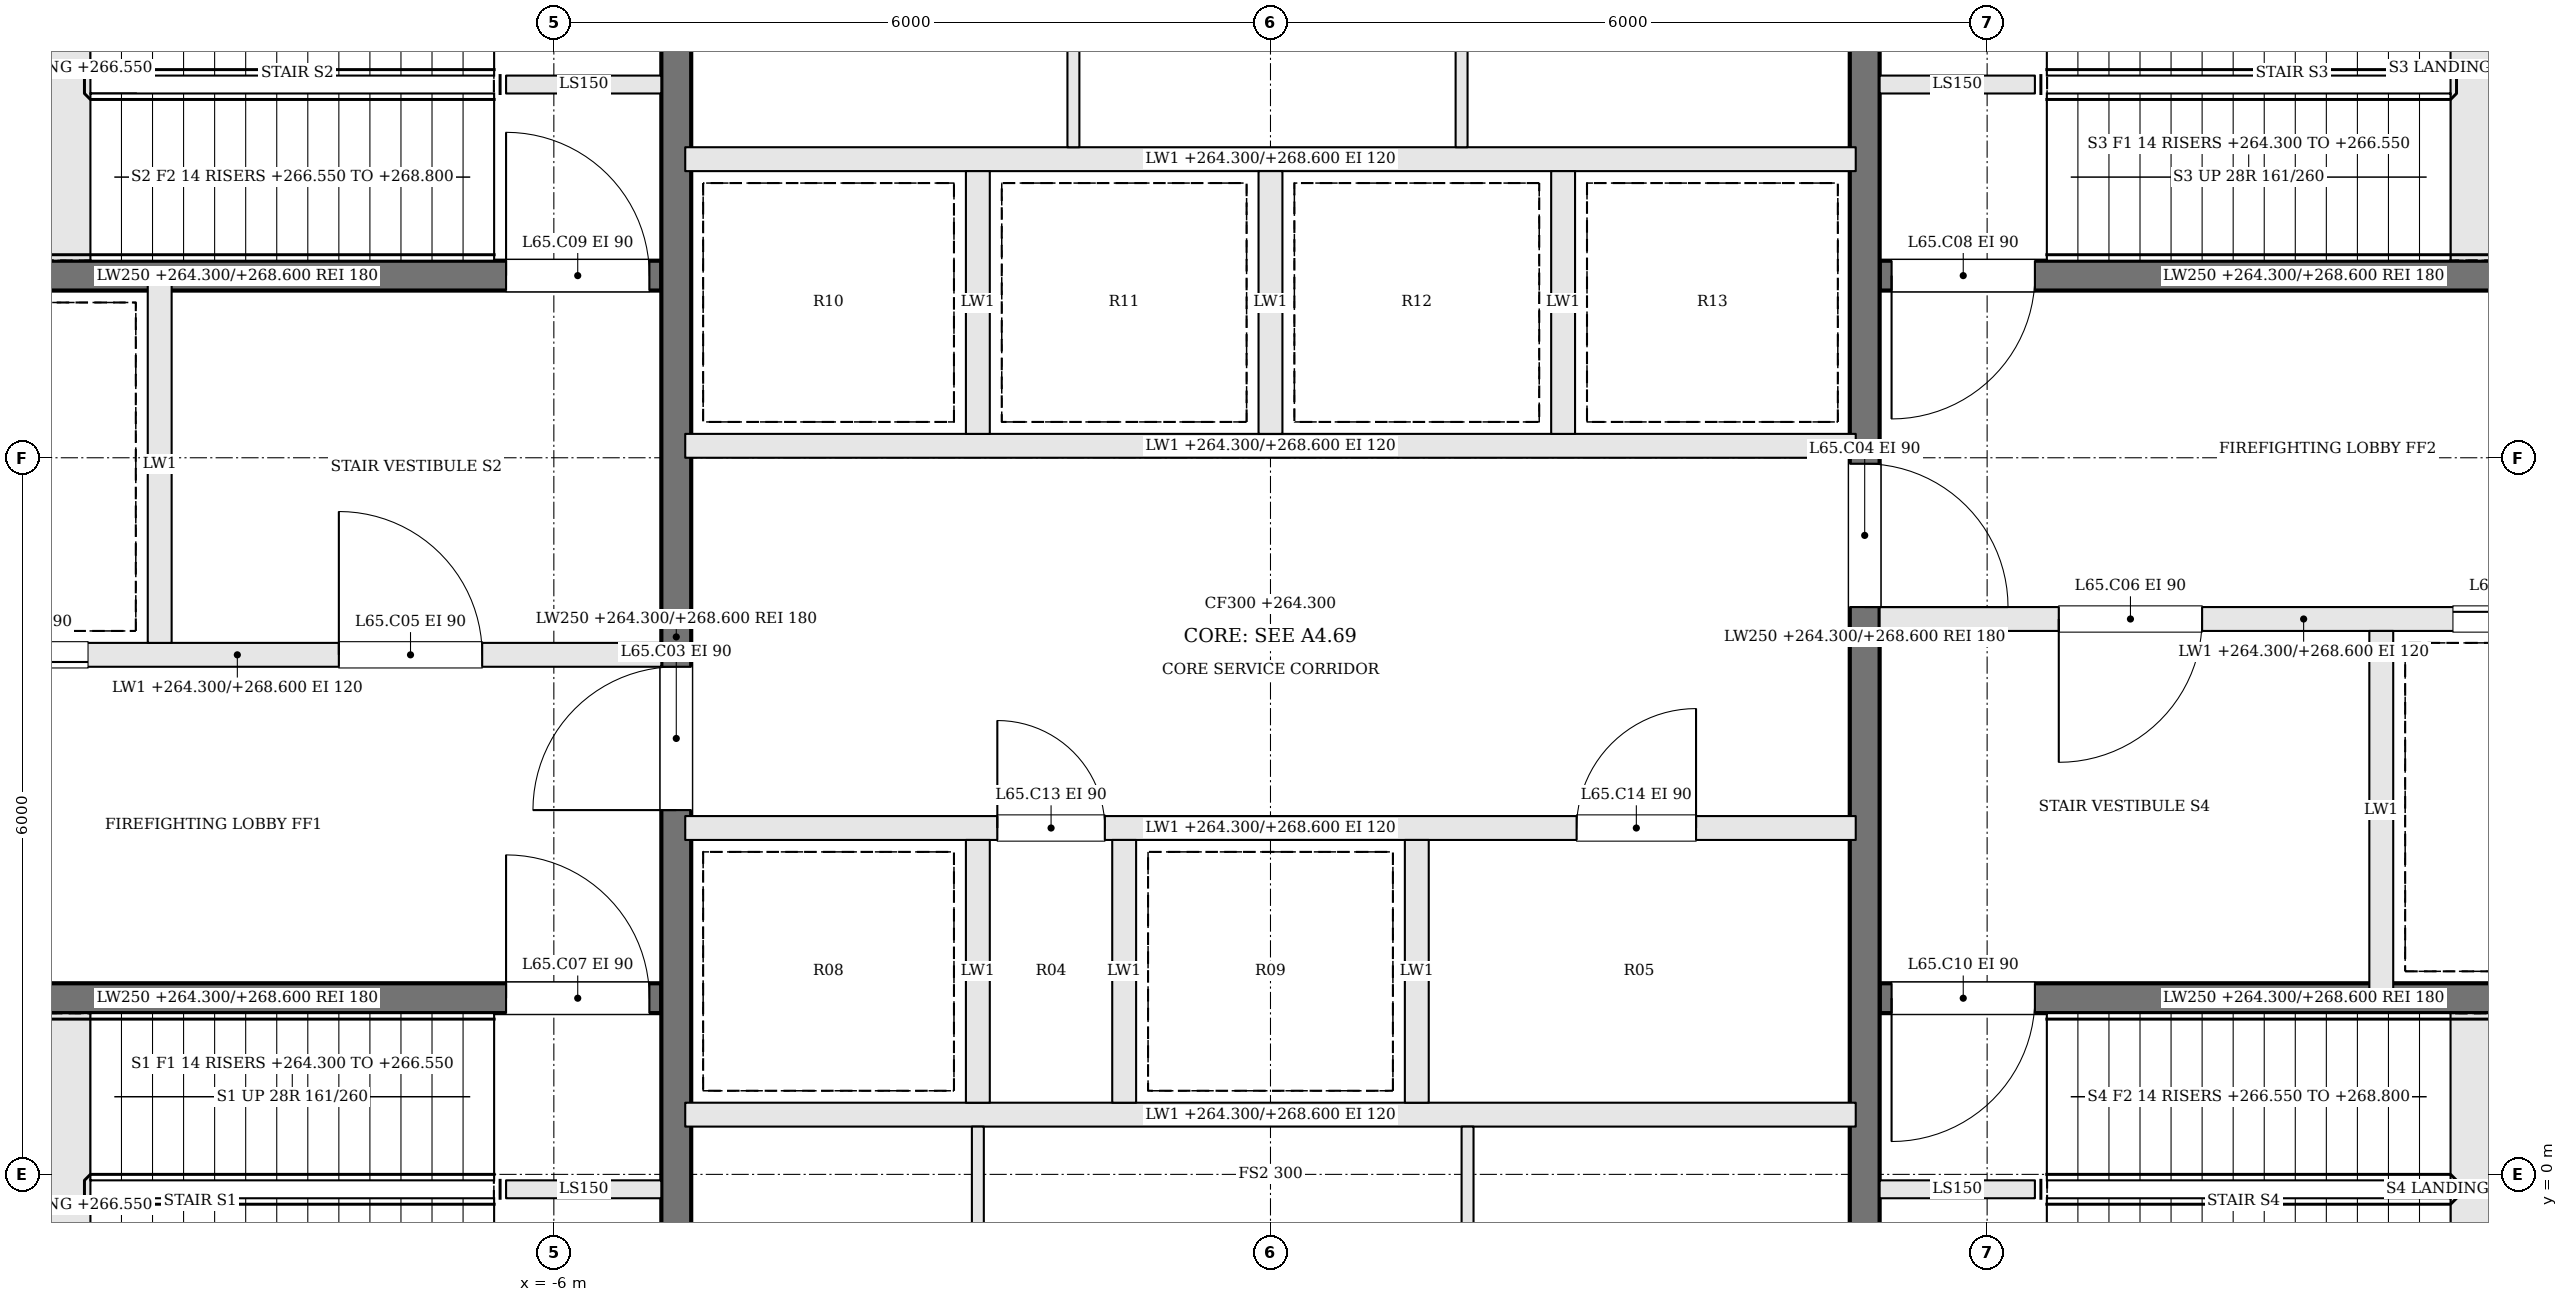
"""IFC4 building model, lengths in metres.
Left out: names, types, materials, properties, quantities, classifications, styles, units other than length and angle.
Written with IfcOpenShell. Run it as: python <this file> out.ifc"""

import sys

from ifc_helpers import new_model, si_unit, direction, frame, frame_2d, origin, place, context, subcontext, project, spatial, rectangle, extrude, element, fill, save


model = new_model("IFC4")
c1 = context("Model", 3, precision=1e-05, world=origin(), true_north=direction((0.0, 1.0)))
c2 = subcontext(c1, "Body", "Model", "MODEL_VIEW")
j1 = project(units=[si_unit("LENGTHUNIT", "METRE"), si_unit("PLANEANGLEUNIT", "RADIAN")], contexts=[c1])
p1 = place(None, origin())
s1 = spatial("IfcSite", under=j1, at=p1, CompositionType="ELEMENT")
p2 = place(p1, origin())
s2 = spatial("IfcBuilding", under=s1, at=p2, CompositionType="ELEMENT")
p3 = place(p2, frame((0.0, 0.0, 264.3)))
s3 = spatial("IfcBuildingStorey", under=s2, at=p3, CompositionType="ELEMENT", Elevation=264.3)
for number, where, z_axis, x_axis in (
    (1, (-6.4, -0.125, 0.0), (0.0, 0.0, 1.0), (1.0, 0.0, 0.0)),
    (2, (6.4, 9.125, 0.0), (0.0, 0.0, 1.0), (-1.0, 0.0, 0.0)),
    (3, (-6.4, 9.125, 0.0), (0.0, 0.0, 1.0), (1.0, 0.0, 0.0)),
    (4, (6.4, -0.125, 0.0), (0.0, 0.0, 1.0), (-1.0, 0.0, 0.0)),
):
    element("IfcWall", number, at=place(p3, frame(where, z_axis=z_axis, x_axis=x_axis)), inside=s3, PredefinedType="SOLIDWALL", context=c2, shape_type="SweptSolid", body=[
        extrude(rectangle(XDim=1.3, YDim=0.15, at=frame_2d((0.65, 0.0))), origin(), (0.0, 0.0, 1.0), 4.3),
    ])
p4 = place(p3, frame((-12.2, 1.475, 0.0), z_axis=(0.0, 0.0, 1.0), x_axis=(1.0, 0.0, 0.0)))
e5 = element("IfcWall", 5, at=p4, inside=s3, PredefinedType="SOLIDWALL", context=c2, shape_type="SweptSolid", body=[
    extrude(rectangle(XDim=7.1, YDim=0.25, at=frame_2d((3.55, 0.0))), origin(), (0.0, 0.0, 1.0), 4.3),
])
p5 = place(p4, frame((5.8, 0.0, 0.0)))
e6 = element("IfcOpeningElement", 6, at=p5, cuts=e5, PredefinedType="OPENING", context=c2, shape_type="SweptSolid", body=[
    extrude(rectangle(XDim=1.2, YDim=2.1, at=frame_2d((0.6, 1.05))), frame((0.0, 0.135, 0.0), z_axis=(0.0, -1.0, 0.0), x_axis=(1.0, 0.0, 0.0)), (0.0, 0.0, 1.0), 0.27),
])
p6 = place(p3, frame((12.2, 7.525, 0.0), z_axis=(0.0, 0.0, 1.0), x_axis=(-1.0, 0.0, 0.0)))
e7 = element("IfcWall", 7, at=p6, inside=s3, PredefinedType="SOLIDWALL", context=c2, shape_type="SweptSolid", body=[
    extrude(rectangle(XDim=7.1, YDim=0.25, at=frame_2d((3.55, 0.0))), origin(), (0.0, 0.0, 1.0), 4.3),
])
p7 = place(p6, frame((5.8, 0.0, 0.0)))
e8 = element("IfcOpeningElement", 8, at=p7, cuts=e7, PredefinedType="OPENING", context=c2, shape_type="SweptSolid", body=[
    extrude(rectangle(XDim=1.2, YDim=2.1, at=frame_2d((0.6, 1.05))), frame((0.0, 0.135, 0.0), z_axis=(0.0, -1.0, 0.0), x_axis=(1.0, 0.0, 0.0)), (0.0, 0.0, 1.0), 0.27),
])
p8 = place(p3, frame((-12.2, 4.35, 0.0), z_axis=(0.0, 0.0, 1.0), x_axis=(1.0, 0.0, 0.0)))
e9 = element("IfcWall", 9, at=p8, inside=s3, PredefinedType="SOLIDWALL", context=c2, shape_type="SweptSolid", body=[
    extrude(rectangle(XDim=7.1, YDim=0.2, at=frame_2d((3.55, 0.0))), origin(), (0.0, 0.0, 1.0), 4.3),
])
p9 = place(p8, frame((4.4, 0.0, 0.0)))
e10 = element("IfcOpeningElement", 10, at=p9, cuts=e9, PredefinedType="OPENING", context=c2, shape_type="SweptSolid", body=[
    extrude(rectangle(XDim=1.2, YDim=2.1, at=frame_2d((0.6, 1.05))), frame((0.0, 0.11, 0.0), z_axis=(0.0, -1.0, 0.0), x_axis=(1.0, 0.0, 0.0)), (0.0, 0.0, 1.0), 0.22),
])
p10 = place(p8, frame((1.1, 0.0, 0.0)))
e11 = element("IfcOpeningElement", 11, at=p10, cuts=e9, PredefinedType="OPENING", context=c2, shape_type="SweptSolid", body=[
    extrude(rectangle(XDim=1.2, YDim=2.1, at=frame_2d((0.6, 1.05))), frame((0.0, 0.11, 0.0), z_axis=(0.0, -1.0, 0.0), x_axis=(1.0, 0.0, 0.0)), (0.0, 0.0, 1.0), 0.22),
])
p11 = place(p3, frame((12.2, 4.65, 0.0), z_axis=(0.0, 0.0, 1.0), x_axis=(-1.0, 0.0, 0.0)))
e12 = element("IfcWall", 12, at=p11, inside=s3, PredefinedType="SOLIDWALL", context=c2, shape_type="SweptSolid", body=[
    extrude(rectangle(XDim=7.1, YDim=0.2, at=frame_2d((3.55, 0.0))), origin(), (0.0, 0.0, 1.0), 4.3),
])
p12 = place(p11, frame((4.4, 0.0, 0.0)))
e13 = element("IfcOpeningElement", 13, at=p12, cuts=e12, PredefinedType="OPENING", context=c2, shape_type="SweptSolid", body=[
    extrude(rectangle(XDim=1.2, YDim=2.1, at=frame_2d((0.6, 1.05))), frame((0.0, 0.11, 0.0), z_axis=(0.0, -1.0, 0.0), x_axis=(1.0, 0.0, 0.0)), (0.0, 0.0, 1.0), 0.22),
])
p13 = place(p11, frame((1.1, 0.0, 0.0)))
e14 = element("IfcOpeningElement", 14, at=p13, cuts=e12, PredefinedType="OPENING", context=c2, shape_type="SweptSolid", body=[
    extrude(rectangle(XDim=1.2, YDim=2.1, at=frame_2d((0.6, 1.05))), frame((0.0, 0.11, 0.0), z_axis=(0.0, -1.0, 0.0), x_axis=(1.0, 0.0, 0.0)), (0.0, 0.0, 1.0), 0.22),
])
p14 = place(p3, frame((-12.2, 7.525, 0.0), z_axis=(0.0, 0.0, 1.0), x_axis=(1.0, 0.0, 0.0)))
e15 = element("IfcWall", 15, at=p14, inside=s3, PredefinedType="SOLIDWALL", context=c2, shape_type="SweptSolid", body=[
    extrude(rectangle(XDim=7.1, YDim=0.25, at=frame_2d((3.55, 0.0))), origin(), (0.0, 0.0, 1.0), 4.3),
])
p15 = place(p14, frame((5.8, 0.0, 0.0)))
e16 = element("IfcOpeningElement", 16, at=p15, cuts=e15, PredefinedType="OPENING", context=c2, shape_type="SweptSolid", body=[
    extrude(rectangle(XDim=1.2, YDim=2.1, at=frame_2d((0.6, 1.05))), frame((0.0, 0.135, 0.0), z_axis=(0.0, -1.0, 0.0), x_axis=(1.0, 0.0, 0.0)), (0.0, 0.0, 1.0), 0.27),
])
p16 = place(p3, frame((12.2, 1.475, 0.0), z_axis=(0.0, 0.0, 1.0), x_axis=(-1.0, 0.0, 0.0)))
e17 = element("IfcWall", 17, at=p16, inside=s3, PredefinedType="SOLIDWALL", context=c2, shape_type="SweptSolid", body=[
    extrude(rectangle(XDim=7.1, YDim=0.25, at=frame_2d((3.55, 0.0))), origin(), (0.0, 0.0, 1.0), 4.3),
])
p17 = place(p16, frame((5.8, 0.0, 0.0)))
e18 = element("IfcOpeningElement", 18, at=p17, cuts=e17, PredefinedType="OPENING", context=c2, shape_type="SweptSolid", body=[
    extrude(rectangle(XDim=1.2, YDim=2.1, at=frame_2d((0.6, 1.05))), frame((0.0, 0.135, 0.0), z_axis=(0.0, -1.0, 0.0), x_axis=(1.0, 0.0, 0.0)), (0.0, 0.0, 1.0), 0.27),
])
for number, where, z_axis, x_axis in (
    (19, (-9.3, 4.45, 0.0), (0.0, 0.0, 1.0), (0.0, 1.0, 0.0)),
    (20, (9.3, 4.55, 0.0), (0.0, 0.0, 1.0), (0.0, -1.0, 0.0)),
):
    element("IfcWall", number, at=place(p3, frame(where, z_axis=z_axis, x_axis=x_axis)), inside=s3, PredefinedType="SOLIDWALL", context=c2, shape_type="SweptSolid", body=[
        extrude(rectangle(XDim=3.0, YDim=0.2, at=frame_2d((1.5, 0.0))), origin(), (0.0, 0.0, 1.0), 4.3),
    ])
p18 = place(p3, frame((-4.975, -2.2, 0.0), z_axis=(0.0, 0.0, 1.0), x_axis=(0.0, 1.0, 0.0)))
e21 = element("IfcWall", 21, at=p18, inside=s3, PredefinedType="SOLIDWALL", context=c2, shape_type="SweptSolid", body=[
    extrude(rectangle(XDim=13.4, YDim=0.25, at=frame_2d((6.7, 0.0))), origin(), (0.0, 0.0, 1.0), 4.3),
])
p19 = place(p18, frame((5.25, 0.0, 0.0)))
e22 = element("IfcOpeningElement", 22, at=p19, cuts=e21, PredefinedType="OPENING", context=c2, shape_type="SweptSolid", body=[
    extrude(rectangle(XDim=1.2, YDim=2.1, at=frame_2d((0.6, 1.05))), frame((0.0, 0.135, 0.0), z_axis=(0.0, -1.0, 0.0), x_axis=(1.0, 0.0, 0.0)), (0.0, 0.0, 1.0), 0.27),
])
p20 = place(p3, frame((4.975, 11.2, 0.0), z_axis=(0.0, 0.0, 1.0), x_axis=(0.0, -1.0, 0.0)))
e23 = element("IfcWall", 23, at=p20, inside=s3, PredefinedType="SOLIDWALL", context=c2, shape_type="SweptSolid", body=[
    extrude(rectangle(XDim=13.4, YDim=0.25, at=frame_2d((6.7, 0.0))), origin(), (0.0, 0.0, 1.0), 4.3),
])
p21 = place(p20, frame((5.25, 0.0, 0.0)))
e24 = element("IfcOpeningElement", 24, at=p21, cuts=e23, PredefinedType="OPENING", context=c2, shape_type="SweptSolid", body=[
    extrude(rectangle(XDim=1.2, YDim=2.1, at=frame_2d((0.6, 1.05))), frame((0.0, 0.135, 0.0), z_axis=(0.0, -1.0, 0.0), x_axis=(1.0, 0.0, 0.0)), (0.0, 0.0, 1.0), 0.27),
])
p22 = place(p3, frame((-4.9, 0.5, 0.0), z_axis=(0.0, 0.0, 1.0), x_axis=(1.0, 0.0, 0.0)))
e25 = element("IfcWall", 25, at=p22, inside=s3, PredefinedType="SOLIDWALL", context=c2, shape_type="SweptSolid", body=[
    extrude(rectangle(XDim=9.8, YDim=0.2, at=frame_2d((4.9, 0.0))), origin(), (0.0, 0.0, 1.0), 4.3),
])
p23 = place(p3, frame((-4.9, 2.9, 0.0), z_axis=(0.0, 0.0, 1.0), x_axis=(1.0, 0.0, 0.0)))
e26 = element("IfcWall", 26, at=p23, inside=s3, PredefinedType="SOLIDWALL", context=c2, shape_type="SweptSolid", body=[
    extrude(rectangle(XDim=9.8, YDim=0.2, at=frame_2d((4.9, 0.0))), origin(), (0.0, 0.0, 1.0), 4.3),
])
p24 = place(p23, frame((2.613, 0.0, 0.0)))
e27 = element("IfcOpeningElement", 27, at=p24, cuts=e26, PredefinedType="OPENING", context=c2, shape_type="SweptSolid", body=[
    extrude(rectangle(XDim=0.9, YDim=2.1, at=frame_2d((0.45, 1.05))), frame((0.0, 0.11, 0.0), z_axis=(0.0, -1.0, 0.0), x_axis=(1.0, 0.0, 0.0)), (0.0, 0.0, 1.0), 0.22),
])
p25 = place(p23, frame((7.463, 0.0, 0.0)))
e28 = element("IfcOpeningElement", 28, at=p25, cuts=e26, PredefinedType="OPENING", context=c2, shape_type="SweptSolid", body=[
    extrude(rectangle(XDim=1.0, YDim=2.1, at=frame_2d((0.5, 1.05))), frame((0.0, 0.11, 0.0), z_axis=(0.0, -1.0, 0.0), x_axis=(1.0, 0.0, 0.0)), (0.0, 0.0, 1.0), 0.22),
])
for number, where, z_axis, x_axis in (
    (29, (-4.9, 6.1, 0.0), (0.0, 0.0, 1.0), (1.0, 0.0, 0.0)),
    (30, (-4.9, 8.5, 0.0), (0.0, 0.0, 1.0), (1.0, 0.0, 0.0)),
):
    element("IfcWall", number, at=place(p3, frame(where, z_axis=z_axis, x_axis=x_axis)), inside=s3, PredefinedType="SOLIDWALL", context=c2, shape_type="SweptSolid", body=[
        extrude(rectangle(XDim=9.8, YDim=0.2, at=frame_2d((4.9, 0.0))), origin(), (0.0, 0.0, 1.0), 4.3),
    ])
for number, where, z_axis, x_axis in (
    (31, (-2.45, 0.6, 0.0), (0.0, 0.0, 1.0), (0.0, 1.0, 0.0)),
    (32, (-1.225, 0.6, 0.0), (0.0, 0.0, 1.0), (0.0, 1.0, 0.0)),
    (33, (1.225, 0.6, 0.0), (0.0, 0.0, 1.0), (0.0, 1.0, 0.0)),
    (34, (-2.45, 6.2, 0.0), (0.0, 0.0, 1.0), (0.0, 1.0, 0.0)),
    (35, (0.0, 6.2, 0.0), (0.0, 0.0, 1.0), (0.0, 1.0, 0.0)),
    (36, (2.45, 6.2, 0.0), (0.0, 0.0, 1.0), (0.0, 1.0, 0.0)),
):
    element("IfcWall", number, at=place(p3, frame(where, z_axis=z_axis, x_axis=x_axis)), inside=s3, PredefinedType="SOLIDWALL", context=c2, shape_type="SweptSolid", body=[
        extrude(rectangle(XDim=2.2, YDim=0.2, at=frame_2d((1.1, 0.0))), origin(), (0.0, 0.0, 1.0), 4.3),
    ])
for number, where, z_axis, x_axis in (
    (37, (-2.45, -2.2, 0.0), (0.0, 0.0, 1.0), (0.0, 1.0, 0.0)),
    (38, (1.65, -2.2, 0.0), (0.0, 0.0, 1.0), (0.0, 1.0, 0.0)),
    (39, (-1.65, 8.6, 0.0), (0.0, 0.0, 1.0), (0.0, 1.0, 0.0)),
    (40, (1.6, 8.6, 0.0), (0.0, 0.0, 1.0), (0.0, 1.0, 0.0)),
):
    element("IfcWall", number, at=place(p3, frame(where, z_axis=z_axis, x_axis=x_axis)), inside=s3, PredefinedType="PARTITIONING", context=c2, shape_type="SweptSolid", body=[
        extrude(rectangle(XDim=2.6, YDim=0.1, at=frame_2d((1.3, 0.0))), origin(), (0.0, 0.0, 1.0), 4.3),
    ])
p26 = place(p19, origin())
e41 = element("IfcDoor", 41, at=p26, inside=s3, OperationType="SINGLE_SWING_LEFT", PredefinedType="DOOR", context=c2, shape_type="SweptSolid", body=[
    extrude(rectangle(XDim=1.2, YDim=2.1, at=frame_2d((0.6, 1.05))), frame((0.0, 0.025, 0.0), z_axis=(0.0, -1.0, 0.0), x_axis=(1.0, 0.0, 0.0)), (0.0, 0.0, 1.0), 0.05),
])
fill(e22, e41)
p27 = place(p21, origin())
e42 = element("IfcDoor", 42, at=p27, inside=s3, OperationType="SINGLE_SWING_RIGHT", PredefinedType="DOOR", context=c2, shape_type="SweptSolid", body=[
    extrude(rectangle(XDim=1.2, YDim=2.1, at=frame_2d((0.6, 1.05))), frame((0.0, 0.025, 0.0), z_axis=(0.0, -1.0, 0.0), x_axis=(1.0, 0.0, 0.0)), (0.0, 0.0, 1.0), 0.05),
])
fill(e24, e42)
p28 = place(p9, origin())
e43 = element("IfcDoor", 43, at=p28, inside=s3, OperationType="SINGLE_SWING_LEFT", PredefinedType="DOOR", context=c2, shape_type="SweptSolid", body=[
    extrude(rectangle(XDim=1.2, YDim=2.1, at=frame_2d((0.6, 1.05))), frame((0.0, 0.025, 0.0), z_axis=(0.0, -1.0, 0.0), x_axis=(1.0, 0.0, 0.0)), (0.0, 0.0, 1.0), 0.05),
])
fill(e10, e43)
p29 = place(p12, origin())
e44 = element("IfcDoor", 44, at=p29, inside=s3, OperationType="SINGLE_SWING_RIGHT", PredefinedType="DOOR", context=c2, shape_type="SweptSolid", body=[
    extrude(rectangle(XDim=1.2, YDim=2.1, at=frame_2d((0.6, 1.05))), frame((0.0, 0.025, 0.0), z_axis=(0.0, -1.0, 0.0), x_axis=(1.0, 0.0, 0.0)), (0.0, 0.0, 1.0), 0.05),
])
fill(e13, e44)
p30 = place(p5, origin())
e45 = element("IfcDoor", 45, at=p30, inside=s3, OperationType="SINGLE_SWING_LEFT", PredefinedType="DOOR", context=c2, shape_type="SweptSolid", body=[
    extrude(rectangle(XDim=1.2, YDim=2.1, at=frame_2d((0.6, 1.05))), frame((0.0, 0.025, 0.0), z_axis=(0.0, -1.0, 0.0), x_axis=(1.0, 0.0, 0.0)), (0.0, 0.0, 1.0), 0.05),
])
fill(e6, e45)
p31 = place(p7, origin())
e46 = element("IfcDoor", 46, at=p31, inside=s3, OperationType="SINGLE_SWING_RIGHT", PredefinedType="DOOR", context=c2, shape_type="SweptSolid", body=[
    extrude(rectangle(XDim=1.2, YDim=2.1, at=frame_2d((0.6, 1.05))), frame((0.0, 0.025, 0.0), z_axis=(0.0, -1.0, 0.0), x_axis=(1.0, 0.0, 0.0)), (0.0, 0.0, 1.0), 0.05),
])
fill(e8, e46)
p32 = place(p15, origin())
e47 = element("IfcDoor", 47, at=p32, inside=s3, OperationType="SINGLE_SWING_LEFT", PredefinedType="DOOR", context=c2, shape_type="SweptSolid", body=[
    extrude(rectangle(XDim=1.2, YDim=2.1, at=frame_2d((0.6, 1.05))), frame((0.0, 0.025, 0.0), z_axis=(0.0, -1.0, 0.0), x_axis=(1.0, 0.0, 0.0)), (0.0, 0.0, 1.0), 0.05),
])
fill(e16, e47)
p33 = place(p17, origin())
e48 = element("IfcDoor", 48, at=p33, inside=s3, OperationType="SINGLE_SWING_RIGHT", PredefinedType="DOOR", context=c2, shape_type="SweptSolid", body=[
    extrude(rectangle(XDim=1.2, YDim=2.1, at=frame_2d((0.6, 1.05))), frame((0.0, 0.025, 0.0), z_axis=(0.0, -1.0, 0.0), x_axis=(1.0, 0.0, 0.0)), (0.0, 0.0, 1.0), 0.05),
])
fill(e18, e48)
p34 = place(p10, origin())
e49 = element("IfcDoor", 49, at=p34, inside=s3, OperationType="SLIDING_TO_RIGHT", PredefinedType="DOOR", context=c2, shape_type="SweptSolid", body=[
    extrude(rectangle(XDim=1.2, YDim=2.1, at=frame_2d((0.6, 1.05))), frame((0.0, 0.025, 0.0), z_axis=(0.0, -1.0, 0.0), x_axis=(1.0, 0.0, 0.0)), (0.0, 0.0, 1.0), 0.05),
])
fill(e11, e49)
p35 = place(p13, origin())
e50 = element("IfcDoor", 50, at=p35, inside=s3, OperationType="SLIDING_TO_RIGHT", PredefinedType="DOOR", context=c2, shape_type="SweptSolid", body=[
    extrude(rectangle(XDim=1.2, YDim=2.1, at=frame_2d((0.6, 1.05))), frame((0.0, 0.025, 0.0), z_axis=(0.0, -1.0, 0.0), x_axis=(1.0, 0.0, 0.0)), (0.0, 0.0, 1.0), 0.05),
])
fill(e14, e50)
p36 = place(p24, origin())
e51 = element("IfcDoor", 51, at=p36, inside=s3, OperationType="SINGLE_SWING_LEFT", PredefinedType="DOOR", context=c2, shape_type="SweptSolid", body=[
    extrude(rectangle(XDim=0.9, YDim=2.1, at=frame_2d((0.45, 1.05))), frame((0.0, 0.025, 0.0), z_axis=(0.0, -1.0, 0.0), x_axis=(1.0, 0.0, 0.0)), (0.0, 0.0, 1.0), 0.05),
])
fill(e27, e51)
p37 = place(p25, origin())
e52 = element("IfcDoor", 52, at=p37, inside=s3, OperationType="SINGLE_SWING_RIGHT", PredefinedType="DOOR", context=c2, shape_type="SweptSolid", body=[
    extrude(rectangle(XDim=1.0, YDim=2.1, at=frame_2d((0.5, 1.05))), frame((0.0, 0.025, 0.0), z_axis=(0.0, -1.0, 0.0), x_axis=(1.0, 0.0, 0.0)), (0.0, 0.0, 1.0), 0.05),
])
fill(e28, e52)
save(model, sys.argv[1])
